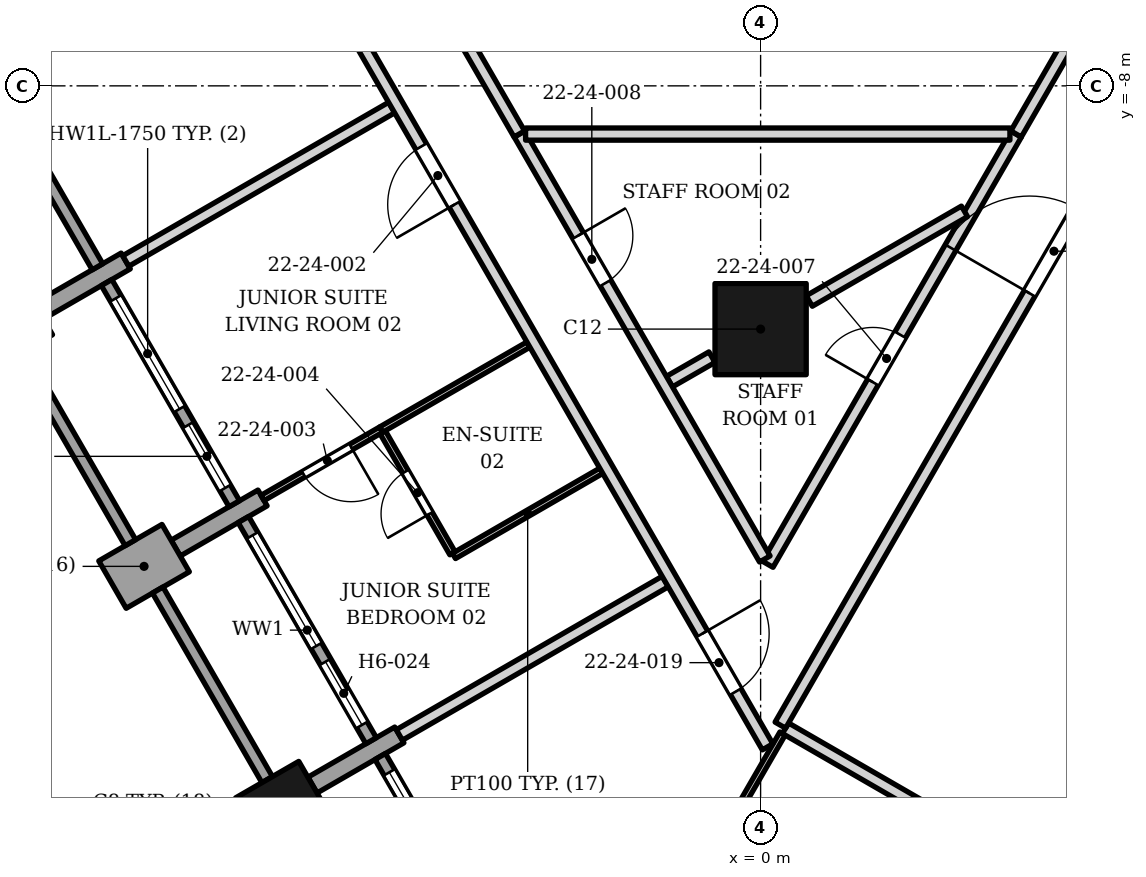
"""IFC4 building model, lengths in metres.
Left out: names, types, materials, properties, quantities, classifications, styles, units other than length and angle.
Written with IfcOpenShell. Run it as: python <this file> out.ifc"""

import sys

from ifc_helpers import new_model, si_unit, direction, frame, frame_2d, origin, origin_2d, place, context, subcontext, project, spatial, rectangle, extrude, element, fill, save


model = new_model("IFC4")
c1 = context("Model", 3, precision=1e-05, world=origin(), true_north=direction((0.0, 1.0)))
c2 = subcontext(c1, "Body", "Model", "MODEL_VIEW")
j1 = project(units=[si_unit("LENGTHUNIT", "METRE"), si_unit("PLANEANGLEUNIT", "RADIAN")], contexts=[c1])
p1 = place(None, origin())
s1 = spatial("IfcSite", under=j1, at=p1, CompositionType="ELEMENT")
p2 = place(p1, origin())
s2 = spatial("IfcBuilding", under=s1, at=p2, CompositionType="ELEMENT")
p3 = place(p2, frame((0.0, 0.0, 102.0)))
s3 = spatial("IfcBuildingStorey", under=s2, at=p3, CompositionType="ELEMENT", Elevation=102.0)
p4 = place(p3, frame((0.0, -12.0, 0.0), z_axis=(0.0, 0.0, 1.0), x_axis=(1.0, 0.0, 0.0)))
e1 = element("IfcColumn", 1, at=p4, inside=s3, PredefinedType="COLUMN", context=c2, shape_type="SweptSolid", body=[
    extrude(rectangle(XDim=1.5, YDim=1.5, at=origin_2d()), origin(), (0.0, 0.0, 1.0), 3.4),
])
for number, where, z_axis, x_axis in (
    (2, (-12.39, -12.003, 0.0), (0.0, 0.0, 1.0), (0.5, -0.866, 0.0)),
    (3, (-7.89, -19.799, 0.0), (0.0, 0.0, 1.0), (0.5, -0.866, 0.0)),
):
    element("IfcColumn", number, at=place(p3, frame(where, z_axis=z_axis, x_axis=x_axis)), inside=s3, PredefinedType="COLUMN", context=c2, shape_type="SweptSolid", body=[
        extrude(rectangle(XDim=0.9, YDim=1.2, at=origin_2d()), origin(), (0.0, 0.0, 1.0), 3.4),
    ])
p5 = place(p3, frame((-11.869, -11.705, 0.0), z_axis=(0.0, 0.0, 1.0), x_axis=(0.865956268984, 0.500119725873, 0.0)))
e4 = element("IfcWall", 4, at=p5, inside=s3, PredefinedType="SOLIDWALL", context=c2, shape_type="SweptSolid", body=[
    extrude(rectangle(XDim=1.649, YDim=0.3, at=frame_2d((0.824, 0.0))), origin(), (0.0, 0.0, 1.0), 2.65),
])
p6 = place(p3, frame((-10.659, -16.202, 0.0), z_axis=(0.0, 0.0, 1.0), x_axis=(0.865955154139, 0.50012165622, 0.0)))
e5 = element("IfcWall", 5, at=p6, inside=s3, PredefinedType="SOLIDWALL", context=c2, shape_type="SweptSolid", body=[
    extrude(rectangle(XDim=1.2, YDim=0.9, at=frame_2d((0.6, 0.0))), origin(), (0.0, 0.0, 1.0), 2.63),
])
for number, where, z_axis, x_axis in (
    (6, (-9.62, -15.602, 0.0), (0.0, 0.0, 1.0), (0.866, 0.5, 0.0)),
    (7, (-7.37, -19.499, 0.0), (0.0, 0.0, 1.0), (0.866, 0.5, 0.0)),
):
    element("IfcWall", number, at=place(p3, frame(where, z_axis=z_axis, x_axis=x_axis)), inside=s3, PredefinedType="SOLIDWALL", context=c2, shape_type="SweptSolid", body=[
        extrude(rectangle(XDim=1.65, YDim=0.3, at=frame_2d((0.825, 0.0))), origin(), (0.0, 0.0, 1.0), 2.65),
    ])
p7 = place(p3, frame((-13.006, -7.338, 0.0), z_axis=(0.0, 0.0, 1.0), x_axis=(0.500002543286, -0.866023935413, 0.0)))
e8 = element("IfcWall", 8, at=p7, inside=s3, PredefinedType="ELEMENTEDWALL", context=c2, shape_type="SweptSolid", body=[
    extrude(rectangle(XDim=4.2, YDim=0.2, at=frame_2d((2.1, 0.0))), origin(), (0.0, 0.0, 1.0), 2.65),
])
p8 = place(p3, frame((-12.165, -12.395, 0.0), z_axis=(0.0, 0.0, 1.0), x_axis=(0.499961193289, -0.866047807691, 0.0)))
e9 = element("IfcWall", 9, at=p8, inside=s3, PredefinedType="SOLIDWALL", context=c2, shape_type="SweptSolid", body=[
    extrude(rectangle(XDim=3.6, YDim=0.2, at=frame_2d((1.8, 0.0))), origin(), (0.0, 0.0, 1.0), 2.63),
])
p9 = place(p3, frame((-10.756, -11.235, 0.0), z_axis=(0.0, 0.0, 1.0), x_axis=(0.500027713859, -0.866009402589, 0.0)))
e10 = element("IfcWall", 10, at=p9, inside=s3, PredefinedType="ELEMENTEDWALL", context=c2, shape_type="SweptSolid", body=[
    extrude(rectangle(XDim=4.2, YDim=0.2, at=frame_2d((2.1, 0.0))), origin(), (0.0, 0.0, 1.0), 2.45),
])
p10 = place(p9, frame((0.3, 0.0, 0.6)))
e11 = element("IfcOpeningElement", 11, at=p10, cuts=e10, PredefinedType="OPENING", context=c2, shape_type="SweptSolid", body=[
    extrude(rectangle(XDim=2.1, YDim=1.75, at=frame_2d((1.05, 0.875))), frame((0.0, 0.11, 0.0), z_axis=(0.0, -1.0, 0.0), x_axis=(1.0, 0.0, 0.0)), (0.0, 0.0, 1.0), 0.22),
])
p11 = place(p9, frame((2.7, 0.0, 0.0)))
e12 = element("IfcOpeningElement", 12, at=p11, cuts=e10, PredefinedType="OPENING", context=c2, shape_type="SweptSolid", body=[
    extrude(rectangle(XDim=1.2, YDim=2.35, at=frame_2d((0.6, 1.175))), frame((0.0, 0.11, 0.0), z_axis=(0.0, -1.0, 0.0), x_axis=(1.0, 0.0, 0.0)), (0.0, 0.0, 1.0), 0.22),
])
p12 = place(p3, frame((-9.915, -16.292, 0.0), z_axis=(0.0, 0.0, 1.0), x_axis=(0.499961193289, -0.866047807691, 0.0)))
e13 = element("IfcWall", 13, at=p12, inside=s3, PredefinedType="SOLIDWALL", context=c2, shape_type="SweptSolid", body=[
    extrude(rectangle(XDim=3.6, YDim=0.2, at=frame_2d((1.8, 0.0))), origin(), (0.0, 0.0, 1.0), 2.63),
])
p13 = place(p3, frame((-8.506, -15.132, 0.0), z_axis=(0.0, 0.0, 1.0), x_axis=(0.500027713859, -0.866009402589, 0.0)))
e14 = element("IfcWall", 14, at=p13, inside=s3, PredefinedType="ELEMENTEDWALL", context=c2, shape_type="SweptSolid", body=[
    extrude(rectangle(XDim=4.2, YDim=0.2, at=frame_2d((2.1, 0.0))), origin(), (0.0, 0.0, 1.0), 2.65),
])
p14 = place(p13, frame((0.3, 0.0, 0.6)))
e15 = element("IfcOpeningElement", 15, at=p14, cuts=e14, PredefinedType="OPENING", context=c2, shape_type="SweptSolid", body=[
    extrude(rectangle(XDim=2.1, YDim=1.8, at=frame_2d((1.05, 0.9))), frame((0.0, 0.11, 0.0), z_axis=(0.0, -1.0, 0.0), x_axis=(1.0, 0.0, 0.0)), (0.0, 0.0, 1.0), 0.22),
])
p15 = place(p13, frame((2.7, 0.0, 0.0)))
e16 = element("IfcOpeningElement", 16, at=p15, cuts=e14, PredefinedType="OPENING", context=c2, shape_type="SweptSolid", body=[
    extrude(rectangle(XDim=1.2, YDim=2.4, at=frame_2d((0.6, 1.2))), frame((0.0, 0.11, 0.0), z_axis=(0.0, -1.0, 0.0), x_axis=(1.0, 0.0, 0.0)), (0.0, 0.0, 1.0), 0.22),
])
p16 = place(p3, frame((-6.256, -19.029, 0.0), z_axis=(0.0, 0.0, 1.0), x_axis=(0.500002543286, -0.866023935413, 0.0)))
e17 = element("IfcWall", 17, at=p16, inside=s3, PredefinedType="ELEMENTEDWALL", context=c2, shape_type="SweptSolid", body=[
    extrude(rectangle(XDim=4.2, YDim=0.2, at=frame_2d((2.1, 0.0))), origin(), (0.0, 0.0, 1.0), 2.628),
])
p17 = place(p16, frame((0.3, 0.0, 0.6)))
e18 = element("IfcOpeningElement", 18, at=p17, cuts=e17, PredefinedType="OPENING", context=c2, shape_type="SweptSolid", body=[
    extrude(rectangle(XDim=2.1, YDim=1.8, at=frame_2d((1.05, 0.9))), frame((0.0, 0.11, 0.0), z_axis=(0.0, -1.0, 0.0), x_axis=(1.0, 0.0, 0.0)), (0.0, 0.0, 1.0), 0.22),
])
p18 = place(p16, frame((2.7, 0.0, 0.0)))
e19 = element("IfcOpeningElement", 19, at=p18, cuts=e17, PredefinedType="OPENING", context=c2, shape_type="SweptSolid", body=[
    extrude(rectangle(XDim=1.2, YDim=2.4, at=frame_2d((0.6, 1.2))), frame((0.0, 0.11, 0.0), z_axis=(0.0, -1.0, 0.0), x_axis=(1.0, 0.0, 0.0)), (0.0, 0.0, 1.0), 0.22),
])
p19 = place(p3, frame((-5.941, -18.675, 0.0), z_axis=(0.0, 0.0, 1.0), x_axis=(0.866176731722, 0.499737800674, 0.0)))
e20 = element("IfcWall", 20, at=p19, inside=s3, PredefinedType="PARTITIONING", context=c2, shape_type="SweptSolid", body=[
    extrude(rectangle(XDim=5.05, YDim=0.2, at=frame_2d((2.525, 0.0))), origin(), (0.0, 0.0, 1.0), 2.628),
])
p20 = place(p3, frame((-0.665, -20.425, 0.0), z_axis=(0.0, 0.0, 1.0), x_axis=(0.500646589026, 0.865651773461, 0.0)))
e21 = element("IfcWall", 21, at=p20, inside=s3, PredefinedType="PARTITIONING", context=c2, shape_type="SweptSolid", body=[
    extrude(rectangle(XDim=2.05, YDim=0.1, at=frame_2d((1.025, 0.0))), origin(), (0.0, 0.0, 1.0), 2.552),
])
p21 = place(p3, frame((0.409, -18.564, 0.0), z_axis=(0.0, 0.0, 1.0), x_axis=(0.866008881804, -0.500028615818, 0.0)))
e22 = element("IfcWall", 22, at=p21, inside=s3, PredefinedType="PARTITIONING", context=c2, shape_type="SweptSolid", body=[
    extrude(rectangle(XDim=6.649, YDim=0.2, at=frame_2d((3.325, 0.0))), origin(), (0.0, 0.0, 1.0), 2.552),
])
p22 = place(p3, frame((0.117, -15.868, 0.0), z_axis=(0.0, 0.0, 1.0), x_axis=(0.500006185809, 0.866021832376, 0.0)))
e23 = element("IfcWall", 23, at=p22, inside=s3, PredefinedType="PARTITIONING", context=c2, shape_type="SweptSolid", body=[
    extrude(rectangle(XDim=8.168, YDim=0.2, at=frame_2d((4.084, 0.0))), origin(), (0.0, 0.0, 1.0), 2.302),
])
p23 = place(p22, frame((3.458, 0.0, 0.0)))
e24 = element("IfcOpeningElement", 24, at=p23, cuts=e23, PredefinedType="OPENING", context=c2, shape_type="SweptSolid", body=[
    extrude(rectangle(XDim=0.9, YDim=2.1, at=frame_2d((0.45, 1.05))), frame((0.0, 0.11, 0.0), z_axis=(0.0, -1.0, 0.0), x_axis=(1.0, 0.0, 0.0)), (0.0, 0.0, 1.0), 0.22),
])
p24 = place(p3, frame((-5.043, -15.731, 0.0), z_axis=(0.0, 0.0, 1.0), x_axis=(0.865682875764, 0.500592807188, 0.0)))
e25 = element("IfcWall", 25, at=p24, inside=s3, PredefinedType="PARTITIONING", context=c2, shape_type="SweptSolid", body=[
    extrude(rectangle(XDim=2.8, YDim=0.1, at=frame_2d((1.4, 0.0))), origin(), (0.0, 0.0, 1.0), 2.628),
])
p25 = place(p3, frame((-6.215, -13.696, 0.0), z_axis=(0.0, 0.0, 1.0), x_axis=(0.499418922955, -0.86636062895, 0.0)))
e26 = element("IfcWall", 26, at=p25, inside=s3, PredefinedType="PARTITIONING", context=c2, shape_type="SweptSolid", body=[
    extrude(rectangle(XDim=2.298, YDim=0.1, at=frame_2d((1.149, 0.0))), origin(), (0.0, 0.0, 1.0), 3.23),
])
p26 = place(p25, frame((0.748, 0.0, 0.0)))
e27 = element("IfcOpeningElement", 27, at=p26, cuts=e26, PredefinedType="OPENING", context=c2, shape_type="SweptSolid", body=[
    extrude(rectangle(XDim=0.8, YDim=2.1, at=frame_2d((0.4, 1.05))), frame((0.0, 0.06, 0.0), z_axis=(0.0, -1.0, 0.0), x_axis=(1.0, 0.0, 0.0)), (0.0, 0.0, 1.0), 0.12),
])
p27 = place(p3, frame((-8.191, -14.777, 0.0), z_axis=(0.0, 0.0, 1.0), x_axis=(0.866427577834, 0.499302766234, 0.0)))
e28 = element("IfcWall", 28, at=p27, inside=s3, PredefinedType="PARTITIONING", context=c2, shape_type="SweptSolid", body=[
    extrude(rectangle(XDim=2.25, YDim=0.1, at=frame_2d((1.125, 0.0))), origin(), (0.0, 0.0, 1.0), 3.23),
])
p28 = place(p27, frame((0.78, 0.0, 0.0)))
e29 = element("IfcOpeningElement", 29, at=p28, cuts=e28, PredefinedType="OPENING", context=c2, shape_type="SweptSolid", body=[
    extrude(rectangle(XDim=0.9, YDim=2.1, at=frame_2d((0.45, 1.05))), frame((0.0, 0.06, 0.0), z_axis=(0.0, -1.0, 0.0), x_axis=(1.0, 0.0, 0.0)), (0.0, 0.0, 1.0), 0.12),
])
p29 = place(p3, frame((-1.5, -12.864, 0.0), z_axis=(0.0, 0.0, 1.0), x_axis=(0.866955334919, 0.498385841749, 0.0)))
e30 = element("IfcWall", 30, at=p29, inside=s3, PredefinedType="PARTITIONING", context=c2, shape_type="SweptSolid", body=[
    extrude(rectangle(XDim=0.807, YDim=0.2, at=frame_2d((0.403, 0.0))), origin(), (0.0, 0.0, 1.0), 3.23),
])
p30 = place(p3, frame((-6.24, -13.653, 0.0), z_axis=(0.0, 0.0, 1.0), x_axis=(0.865995230276, 0.500052258409, 0.0)))
e31 = element("IfcWall", 31, at=p30, inside=s3, PredefinedType="PARTITIONING", context=c2, shape_type="SweptSolid", body=[
    extrude(rectangle(XDim=2.798, YDim=0.1, at=frame_2d((1.399, 0.0))), origin(), (0.0, 0.0, 1.0), 2.628),
])
p31 = place(p3, frame((0.8, -11.538, 0.0), z_axis=(0.0, 0.0, 1.0), x_axis=(0.866017313224, 0.500014013, 0.0)))
e32 = element("IfcWall", 32, at=p31, inside=s3, PredefinedType="PARTITIONING", context=c2, shape_type="SweptSolid", body=[
    extrude(rectangle(XDim=2.948, YDim=0.2, at=frame_2d((1.474, 0.0))), origin(), (0.0, 0.0, 1.0), 3.23),
])
p32 = place(p3, frame((-3.965, -8.793, 0.0), z_axis=(0.0, 0.0, 1.0), x_axis=(0.499992237426, -0.866029885462, 0.0)))
e33 = element("IfcWall", 33, at=p32, inside=s3, PredefinedType="PARTITIONING", context=c2, shape_type="SweptSolid", body=[
    extrude(rectangle(XDim=8.069, YDim=0.2, at=frame_2d((4.034, 0.0))), origin(), (0.0, 0.0, 1.0), 2.45),
])
p33 = place(p32, frame((1.928, 0.0, 0.0)))
e34 = element("IfcOpeningElement", 34, at=p33, cuts=e33, PredefinedType="OPENING", context=c2, shape_type="SweptSolid", body=[
    extrude(rectangle(XDim=0.9, YDim=2.1, at=frame_2d((0.45, 1.05))), frame((0.0, 0.11, 0.0), z_axis=(0.0, -1.0, 0.0), x_axis=(1.0, 0.0, 0.0)), (0.0, 0.0, 1.0), 0.22),
])
p34 = place(p3, frame((-3.865, -8.793, 0.0), z_axis=(0.0, 0.0, 1.0), x_axis=(1.0, 0.0, 0.0)))
e35 = element("IfcWall", 35, at=p34, inside=s3, PredefinedType="PARTITIONING", context=c2, shape_type="SweptSolid", body=[
    extrude(rectangle(XDim=7.965, YDim=0.2, at=frame_2d((3.983, 0.0))), origin(), (0.0, 0.0, 1.0), 2.474),
])
p35 = place(p3, frame((4.201, -8.791, 0.0), z_axis=(0.0, 0.0, 1.0), x_axis=(0.500109238176, 0.865962325907, 0.0)))
e36 = element("IfcWall", 36, at=p35, inside=s3, PredefinedType="PARTITIONING", context=c2, shape_type="SweptSolid", body=[
    extrude(rectangle(XDim=14.424, YDim=0.2, at=frame_2d((7.212, 0.0))), origin(), (0.0, 0.0, 1.0), 2.384),
])
p36 = place(p35, frame((7.839, 0.0, 0.0)))
e37 = element("IfcOpeningElement", 37, at=p36, cuts=e36, PredefinedType="OPENING", context=c2, shape_type="SweptSolid", body=[
    extrude(rectangle(XDim=1.6, YDim=2.1, at=frame_2d((0.8, 1.05))), frame((0.0, 0.11, 0.0), z_axis=(0.0, -1.0, 0.0), x_axis=(1.0, 0.0, 0.0)), (0.0, 0.0, 1.0), 0.22),
])
p37 = place(p35, frame((4.58, 0.0, 0.0)))
e38 = element("IfcOpeningElement", 38, at=p37, cuts=e36, PredefinedType="OPENING", context=c2, shape_type="SweptSolid", body=[
    extrude(rectangle(XDim=1.6, YDim=2.1, at=frame_2d((0.8, 1.05))), frame((0.0, 0.11, 0.0), z_axis=(0.0, -1.0, 0.0), x_axis=(1.0, 0.0, 0.0)), (0.0, 0.0, 1.0), 0.22),
])
p38 = place(p3, frame((-10.441, -10.88, 0.0), z_axis=(0.0, 0.0, 1.0), x_axis=(0.866188805601, 0.49971687289, 0.0)))
e39 = element("IfcWall", 39, at=p38, inside=s3, PredefinedType="PARTITIONING", context=c2, shape_type="SweptSolid", body=[
    extrude(rectangle(XDim=5.05, YDim=0.2, at=frame_2d((2.525, 0.0))), origin(), (0.0, 0.0, 1.0), 2.552),
])
p39 = place(p3, frame((0.325, -18.513, 0.0), z_axis=(0.0, 0.0, 1.0), x_axis=(0.499996012009, 0.86602770624, 0.0)))
e40 = element("IfcWall", 40, at=p39, inside=s3, PredefinedType="PARTITIONING", context=c2, shape_type="SweptSolid", body=[
    extrude(rectangle(XDim=18.0, YDim=0.2, at=frame_2d((9.0, 0.0))), origin(), (0.0, 0.0, 1.0), 2.302),
])
p40 = place(p39, frame((8.2, 0.0, 0.0)))
e41 = element("IfcOpeningElement", 41, at=p40, cuts=e40, PredefinedType="OPENING", context=c2, shape_type="SweptSolid", body=[
    extrude(rectangle(XDim=1.6, YDim=2.1, at=frame_2d((0.8, 1.05))), frame((0.0, 0.11, 0.0), z_axis=(0.0, -1.0, 0.0), x_axis=(1.0, 0.0, 0.0)), (0.0, 0.0, 1.0), 0.22),
])
p41 = place(p3, frame((-12.913, 3.699, 0.0), z_axis=(0.0, 0.0, 1.0), x_axis=(0.499907630167, -0.866078726964, 0.0)))
e42 = element("IfcWall", 42, at=p41, inside=s3, PredefinedType="PARTITIONING", context=c2, shape_type="SweptSolid", body=[
    extrude(rectangle(XDim=26.06, YDim=0.2, at=frame_2d((13.03, 0.0))), origin(), (0.0, 0.0, 1.0), 2.384),
])
p42 = place(p41, frame((6.312, 0.0, 0.0)))
e43 = element("IfcOpeningElement", 43, at=p42, cuts=e42, PredefinedType="OPENING", context=c2, shape_type="SweptSolid", body=[
    extrude(rectangle(XDim=1.6, YDim=2.1, at=frame_2d((0.8, 1.05))), frame((0.0, 0.11, 0.0), z_axis=(0.0, -1.0, 0.0), x_axis=(1.0, 0.0, 0.0)), (0.0, 0.0, 1.0), 0.22),
])
p43 = place(p41, frame((14.662, 0.0, 0.0)))
e44 = element("IfcOpeningElement", 44, at=p43, cuts=e42, PredefinedType="OPENING", context=c2, shape_type="SweptSolid", body=[
    extrude(rectangle(XDim=1.1, YDim=2.1, at=frame_2d((0.55, 1.05))), frame((0.0, 0.11, 0.0), z_axis=(0.0, -1.0, 0.0), x_axis=(1.0, 0.0, 0.0)), (0.0, 0.0, 1.0), 0.22),
])
p44 = place(p41, frame((23.911, 0.0, 0.0)))
e45 = element("IfcOpeningElement", 45, at=p44, cuts=e42, PredefinedType="OPENING", context=c2, shape_type="SweptSolid", body=[
    extrude(rectangle(XDim=1.1, YDim=2.1, at=frame_2d((0.55, 1.05))), frame((0.0, 0.11, 0.0), z_axis=(0.0, -1.0, 0.0), x_axis=(1.0, 0.0, 0.0)), (0.0, 0.0, 1.0), 0.22),
])
p45 = place(p3, frame((-11.18, 3.7, 0.0), z_axis=(0.0, 0.0, 1.0), x_axis=(0.499994992015, -0.866028295127, 0.0)))
e46 = element("IfcWall", 46, at=p45, inside=s3, PredefinedType="PARTITIONING", context=c2, shape_type="SweptSolid", body=[
    extrude(rectangle(XDim=14.423, YDim=0.2, at=frame_2d((7.211, 0.0))), origin(), (0.0, 0.0, 1.0), 2.384),
])
p46 = place(p10, origin())
e47 = element("IfcWindow", 47, at=p46, inside=s3, PartitioningType="SINGLE_PANEL", PredefinedType="WINDOW", context=c2, shape_type="SweptSolid", body=[
    extrude(rectangle(XDim=2.1, YDim=1.75, at=frame_2d((1.05, 0.875))), frame((0.0, 0.03, 0.0), z_axis=(0.0, -1.0, 0.0), x_axis=(1.0, 0.0, 0.0)), (0.0, 0.0, 1.0), 0.06),
])
fill(e11, e47)
p47 = place(p11, origin())
e48 = element("IfcDoor", 48, at=p47, inside=s3, OperationType="SINGLE_SWING_LEFT", PredefinedType="DOOR", context=c2, shape_type="SweptSolid", body=[
    extrude(rectangle(XDim=1.2, YDim=2.35, at=frame_2d((0.6, 1.175))), frame((0.0, 0.025, 0.0), z_axis=(0.0, -1.0, 0.0), x_axis=(1.0, 0.0, 0.0)), (0.0, 0.0, 1.0), 0.05),
])
fill(e12, e48)
p48 = place(p14, origin())
e49 = element("IfcWindow", 49, at=p48, inside=s3, PartitioningType="SINGLE_PANEL", PredefinedType="WINDOW", context=c2, shape_type="SweptSolid", body=[
    extrude(rectangle(XDim=2.1, YDim=1.8, at=frame_2d((1.05, 0.9))), frame((0.0, 0.03, 0.0), z_axis=(0.0, -1.0, 0.0), x_axis=(1.0, 0.0, 0.0)), (0.0, 0.0, 1.0), 0.06),
])
fill(e15, e49)
p49 = place(p15, origin())
e50 = element("IfcDoor", 50, at=p49, inside=s3, OperationType="SINGLE_SWING_LEFT", PredefinedType="DOOR", context=c2, shape_type="SweptSolid", body=[
    extrude(rectangle(XDim=1.2, YDim=2.4, at=frame_2d((0.6, 1.2))), frame((0.0, 0.025, 0.0), z_axis=(0.0, -1.0, 0.0), x_axis=(1.0, 0.0, 0.0)), (0.0, 0.0, 1.0), 0.05),
])
fill(e16, e50)
p50 = place(p17, origin())
e51 = element("IfcWindow", 51, at=p50, inside=s3, PartitioningType="SINGLE_PANEL", PredefinedType="WINDOW", context=c2, shape_type="SweptSolid", body=[
    extrude(rectangle(XDim=2.1, YDim=1.8, at=frame_2d((1.05, 0.9))), frame((0.0, 0.03, 0.0), z_axis=(0.0, -1.0, 0.0), x_axis=(1.0, 0.0, 0.0)), (0.0, 0.0, 1.0), 0.06),
])
fill(e18, e51)
p51 = place(p43, origin())
e52 = element("IfcDoor", 52, at=p51, inside=s3, OperationType="SINGLE_SWING_RIGHT", PredefinedType="DOOR", context=c2, shape_type="SweptSolid", body=[
    extrude(rectangle(XDim=1.1, YDim=2.1, at=frame_2d((0.55, 1.05))), frame((0.0, 0.025, 0.0), z_axis=(0.0, -1.0, 0.0), x_axis=(1.0, 0.0, 0.0)), (0.0, 0.0, 1.0), 0.05),
])
fill(e44, e52)
p52 = place(p28, origin())
e53 = element("IfcDoor", 53, at=p52, inside=s3, OperationType="SINGLE_SWING_RIGHT", PredefinedType="DOOR", context=c2, shape_type="SweptSolid", body=[
    extrude(rectangle(XDim=0.9, YDim=2.1, at=frame_2d((0.45, 1.05))), frame((0.0, 0.025, 0.0), z_axis=(0.0, -1.0, 0.0), x_axis=(1.0, 0.0, 0.0)), (0.0, 0.0, 1.0), 0.05),
])
fill(e29, e53)
p53 = place(p26, origin())
e54 = element("IfcDoor", 54, at=p53, inside=s3, OperationType="SINGLE_SWING_RIGHT", PredefinedType="DOOR", context=c2, shape_type="SweptSolid", body=[
    extrude(rectangle(XDim=0.8, YDim=2.1, at=frame_2d((0.4, 1.05))), frame((0.0, 0.025, 0.0), z_axis=(0.0, -1.0, 0.0), x_axis=(1.0, 0.0, 0.0)), (0.0, 0.0, 1.0), 0.05),
])
fill(e27, e54)
p54 = place(p40, origin())
e55 = element("IfcDoor", 55, at=p54, inside=s3, OperationType="DOUBLE_DOOR_SINGLE_SWING", PredefinedType="DOOR", context=c2, shape_type="SweptSolid", body=[
    extrude(rectangle(XDim=1.6, YDim=2.1, at=frame_2d((0.8, 1.05))), frame((0.0, 0.025, 0.0), z_axis=(0.0, -1.0, 0.0), x_axis=(1.0, 0.0, 0.0)), (0.0, 0.0, 1.0), 0.05),
])
fill(e41, e55)
p55 = place(p23, origin())
e56 = element("IfcDoor", 56, at=p55, inside=s3, OperationType="SINGLE_SWING_LEFT", PredefinedType="DOOR", context=c2, shape_type="SweptSolid", body=[
    extrude(rectangle(XDim=0.9, YDim=2.1, at=frame_2d((0.45, 1.05))), frame((0.0, 0.025, 0.0), z_axis=(0.0, -1.0, 0.0), x_axis=(1.0, 0.0, 0.0)), (0.0, 0.0, 1.0), 0.05),
])
fill(e24, e56)
p56 = place(p33, origin())
e57 = element("IfcDoor", 57, at=p56, inside=s3, OperationType="SINGLE_SWING_LEFT", PredefinedType="DOOR", context=c2, shape_type="SweptSolid", body=[
    extrude(rectangle(XDim=0.9, YDim=2.1, at=frame_2d((0.45, 1.05))), frame((0.0, 0.025, 0.0), z_axis=(0.0, -1.0, 0.0), x_axis=(1.0, 0.0, 0.0)), (0.0, 0.0, 1.0), 0.05),
])
fill(e34, e57)
p57 = place(p44, origin())
e58 = element("IfcDoor", 58, at=p57, inside=s3, OperationType="SINGLE_SWING_LEFT", PredefinedType="DOOR", context=c2, shape_type="SweptSolid", body=[
    extrude(rectangle(XDim=1.1, YDim=2.1, at=frame_2d((0.55, 1.05))), frame((0.0, 0.025, 0.0), z_axis=(0.0, -1.0, 0.0), x_axis=(1.0, 0.0, 0.0)), (0.0, 0.0, 1.0), 0.05),
])
fill(e45, e58)
save(model, sys.argv[1])
